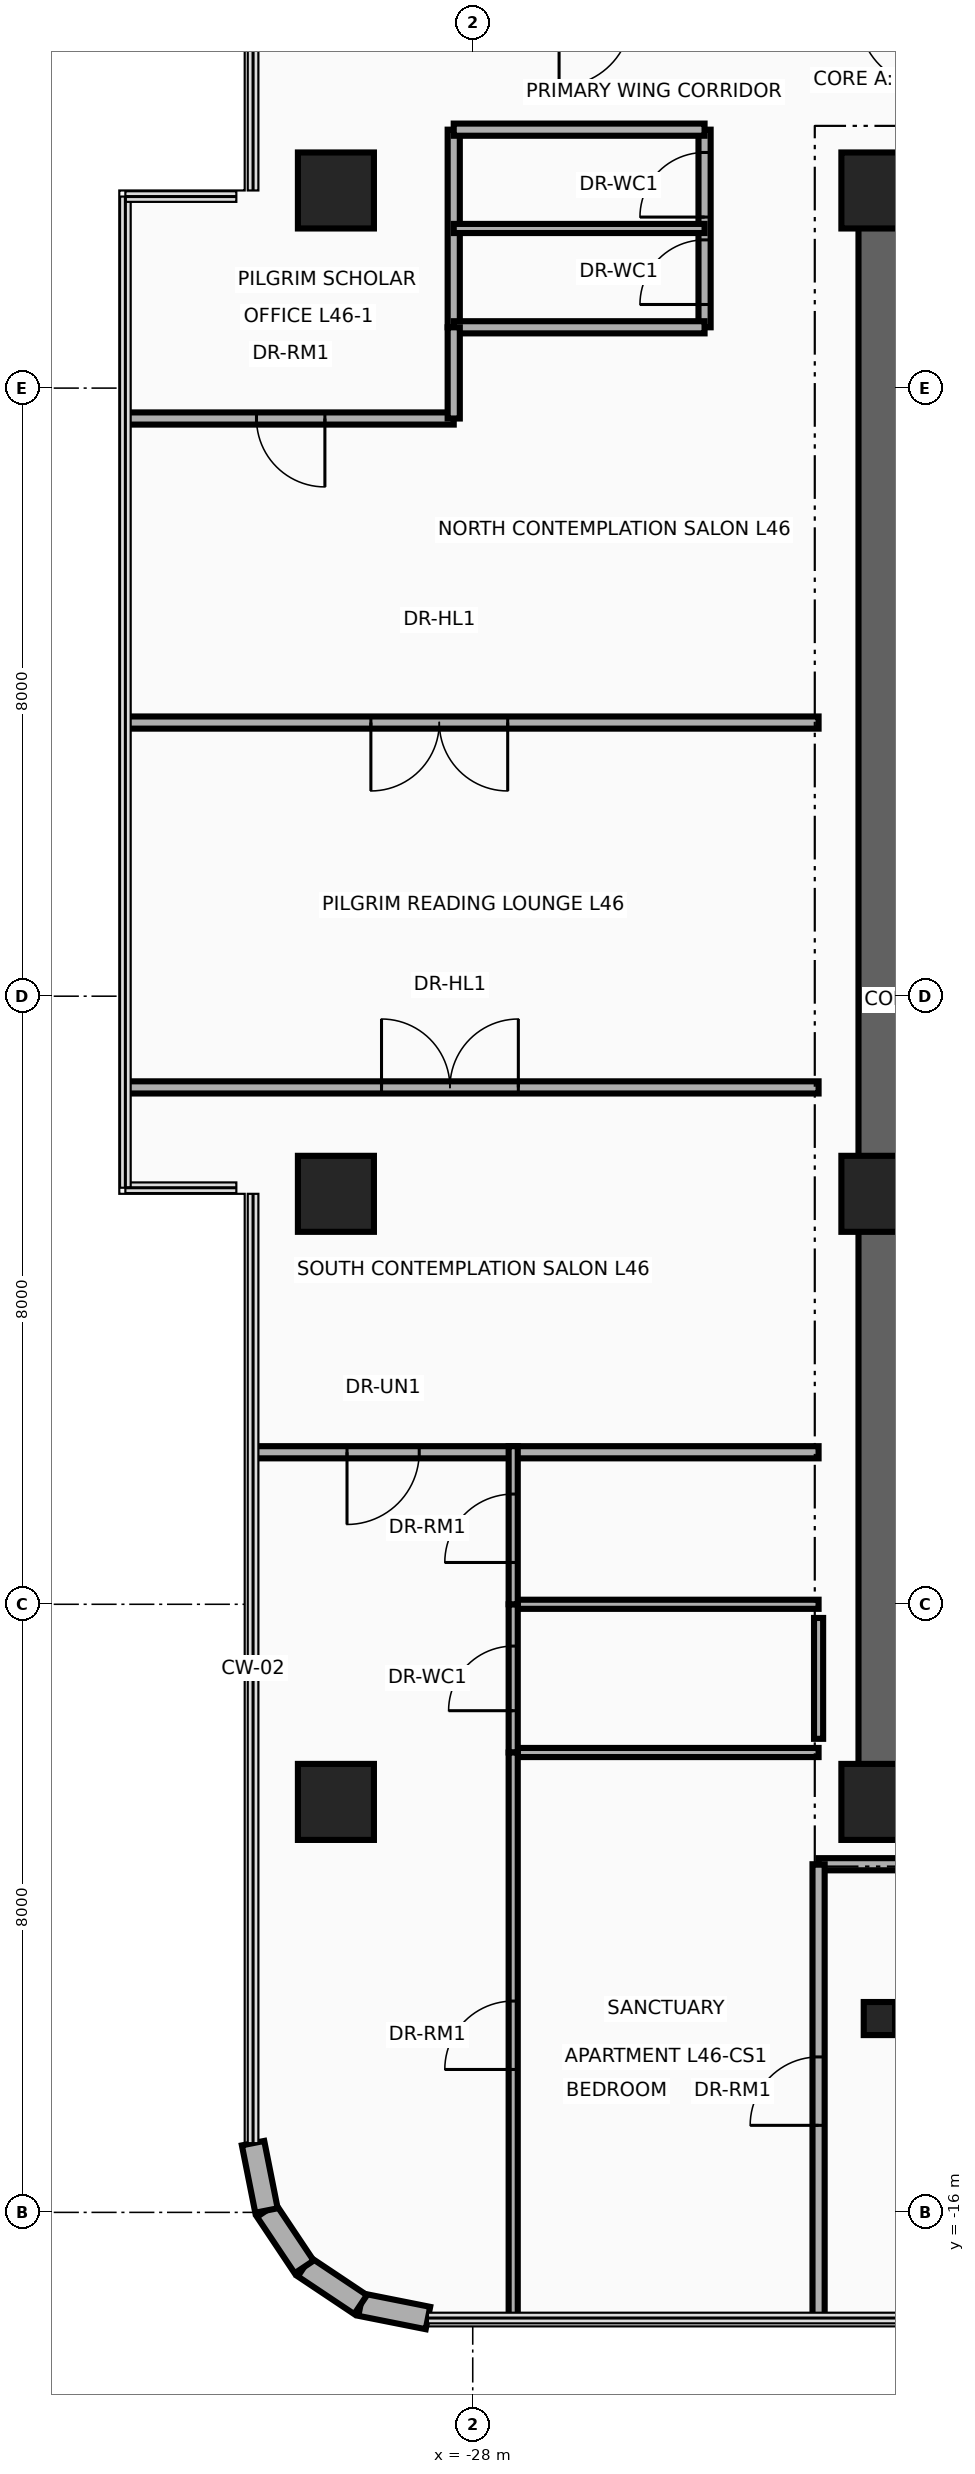
"""IFC4 building model, lengths in metres.
Left out: names, types, materials, properties, quantities, classifications, styles, units other than length and angle.
Written with IfcOpenShell. Run it as: python <this file> out.ifc"""

import sys

from ifc_helpers import new_model, si_unit, direction, frame, frame_2d, origin, origin_2d, place, context, subcontext, project, spatial, rectangle, i_section, extrude, source, transform, mapped, element, fill, save


model = new_model("IFC4")
c1 = context("Model", 3, precision=1e-05, world=origin(), true_north=direction((0.0, 1.0)))
c2 = subcontext(c1, "Body", "Model", "MODEL_VIEW")
j1 = project(units=[si_unit("LENGTHUNIT", "METRE"), si_unit("PLANEANGLEUNIT", "RADIAN")], contexts=[c1])
p1 = place(None, origin())
s1 = spatial("IfcSite", under=j1, at=p1, CompositionType="ELEMENT")
p2 = place(p1, origin())
s2 = spatial("IfcBuilding", under=s1, at=p2, CompositionType="ELEMENT")
p3 = place(p2, frame((0.0, 0.0, 180.5)))
s3 = spatial("IfcBuildingStorey", under=s2, at=p3, CompositionType="ELEMENT", Elevation=180.5)
p4 = place(p3, frame((-22.65, -11.075, 0.0), z_axis=(0.0, 0.0, 1.0), x_axis=(0.0, 1.0, 0.0)))
e1 = element("IfcWall", 1, at=p4, inside=s3, PredefinedType="SHEAR", context=c2, shape_type="SweptSolid", body=[
    extrude(rectangle(XDim=22.15, YDim=0.55, at=frame_2d((11.075, 0.0))), origin(), (0.0, 0.0, 1.0), 3.63),
])
for number, where, z_axis, x_axis in (
    (2, (-22.65, 10.8, 0.0), (0.0, 0.0, 1.0), (1.0, 0.0, 0.0)),
    (3, (-22.65, -10.8, 0.0), (0.0, 0.0, 1.0), (1.0, 0.0, 0.0)),
):
    element("IfcWall", number, at=place(p3, frame(where, z_axis=z_axis, x_axis=x_axis)), inside=s3, PredefinedType="SHEAR", context=c2, shape_type="SweptSolid", body=[
        extrude(rectangle(XDim=10.25, YDim=0.55, at=frame_2d((5.125, 0.0))), origin(), (0.0, 0.0, 1.0), 3.63),
    ])
m1 = source(origin(), c2, "Body", "SweptSolid", [
    extrude(rectangle(XDim=1.0, YDim=1.0, at=origin_2d()), origin(), (0.0, 0.0, 1.0), 3.95),
])
for number, where, z_axis, x_axis in (
    (4, (-29.8, -10.6, 0.0), (0.0, 0.0, 1.0), (1.0, 0.0, 0.0)),
    (5, (-22.65, -10.6, 0.0), (0.0, 0.0, 1.0), (1.0, 0.0, 0.0)),
    (6, (-29.8, -2.6, 0.0), (0.0, 0.0, 1.0), (1.0, 0.0, 0.0)),
    (7, (-22.65, -2.6, 0.0), (0.0, 0.0, 1.0), (1.0, 0.0, 0.0)),
    (8, (-29.8, 10.6, 0.0), (0.0, 0.0, 1.0), (1.0, 0.0, 0.0)),
    (9, (-22.65, 10.6, 0.0), (0.0, 0.0, 1.0), (1.0, 0.0, 0.0)),
):
    element("IfcColumn", number, at=place(p3, frame(where, z_axis=z_axis, x_axis=x_axis)), inside=s3, PredefinedType="COLUMN", context=c2, shape_type="MappedRepresentation", body=[
        mapped(m1, transform((0.0, 0.0, 0.0), x_axis=(1.0, 0.0, 0.0), y_axis=(0.0, 1.0, 0.0), z_axis=(0.0, 0.0, 1.0), scale=1.0)),
    ])
m2 = source(origin(), c2, "Body", "SweptSolid", [
    extrude(i_section(OverallWidth=0.412, OverallDepth=0.435, WebThickness=0.036, FlangeThickness=0.057, at=origin_2d()), origin(), (0.0, 0.0, 1.0), 3.95),
])
p5 = place(p3, frame((-22.65, -13.45, 0.0), z_axis=(0.0, 0.0, 1.0), x_axis=(1.0, 0.0, 0.0)))
e10 = element("IfcColumn", 10, at=p5, inside=s3, PredefinedType="COLUMN", context=c2, shape_type="MappedRepresentation", body=[
    mapped(m2, transform((0.0, 0.0, 0.0), x_axis=(1.0, 0.0, 0.0), y_axis=(0.0, 1.0, 0.0), z_axis=(0.0, 0.0, 1.0), scale=1.0)),
])
p6 = place(p3, frame((-28.589, -17.39, 0.0), z_axis=(0.0, 0.0, 1.0), x_axis=(-0.980798241101, 0.195025152871, 0.0)))
e11 = element("IfcWall", 11, at=p6, inside=s3, PredefinedType="SOLIDWALL", context=c2, shape_type="SweptSolid", body=[
    extrude(rectangle(XDim=0.904, YDim=0.3, at=frame_2d((0.452, 0.0))), origin(), (0.0, 0.0, 1.0), 3.63),
])
for number, where, z_axis, x_axis in (
    (12, (-29.476, -17.214, 0.0), (0.0, 0.0, 1.0), (-0.832, 0.556, 0.0)),
    (13, (-30.218, -16.718, 0.0), (0.0, 0.0, 1.0), (-0.556, 0.832, 0.0)),
):
    element("IfcWall", number, at=place(p3, frame(where, z_axis=z_axis, x_axis=x_axis)), inside=s3, PredefinedType="SOLIDWALL", context=c2, shape_type="SweptSolid", body=[
        extrude(rectangle(XDim=0.893, YDim=0.3, at=frame_2d((0.446, 0.0))), origin(), (0.0, 0.0, 1.0), 3.63),
    ])
p7 = place(p3, frame((-30.714, -15.976, 0.0), z_axis=(0.0, 0.0, 1.0), x_axis=(-0.195025152871, 0.980798241101, 0.0)))
e14 = element("IfcWall", 14, at=p7, inside=s3, PredefinedType="SOLIDWALL", context=c2, shape_type="SweptSolid", body=[
    extrude(rectangle(XDim=0.904, YDim=0.3, at=frame_2d((0.452, 0.0))), origin(), (0.0, 0.0, 1.0), 3.63),
])
p8 = place(p3, frame((-28.25, 8.8, 0.0), z_axis=(0.0, 0.0, 1.0), x_axis=(0.0, 1.0, 0.0)))
e15 = element("IfcWall", 15, at=p8, inside=s3, PredefinedType="PARTITIONING", context=c2, shape_type="SweptSolid", body=[
    extrude(rectangle(XDim=2.6, YDim=0.16, at=frame_2d((1.3, 0.0))), origin(), (0.0, 0.0, 1.0), 2.665),
])
p9 = place(p3, frame((-24.95, 8.8, 0.0), z_axis=(0.0, 0.0, 1.0), x_axis=(0.0, 1.0, 0.0)))
e16 = element("IfcWall", 16, at=p9, inside=s3, PredefinedType="PARTITIONING", context=c2, shape_type="SweptSolid", body=[
    extrude(rectangle(XDim=2.6, YDim=0.16, at=frame_2d((1.3, 0.0))), origin(), (0.0, 0.0, 1.0), 2.665),
])
p10 = place(p9, frame((0.3, 0.0, 0.0)))
e17 = element("IfcOpeningElement", 17, at=p10, cuts=e16, PredefinedType="OPENING", context=c2, shape_type="SweptSolid", body=[
    extrude(rectangle(XDim=0.85, YDim=2.1, at=frame_2d((0.425, 1.05))), frame((0.0, 0.095, 0.0), z_axis=(0.0, -1.0, 0.0), x_axis=(1.0, 0.0, 0.0)), (0.0, 0.0, 1.0), 0.19),
])
p11 = place(p9, frame((1.45, 0.0, 0.0)))
e18 = element("IfcOpeningElement", 18, at=p11, cuts=e16, PredefinedType="OPENING", context=c2, shape_type="SweptSolid", body=[
    extrude(rectangle(XDim=0.85, YDim=2.1, at=frame_2d((0.425, 1.05))), frame((0.0, 0.095, 0.0), z_axis=(0.0, -1.0, 0.0), x_axis=(1.0, 0.0, 0.0)), (0.0, 0.0, 1.0), 0.19),
])
for number, where, z_axis, x_axis in (
    (19, (-28.25, 8.8, 0.0), (0.0, 0.0, 1.0), (1.0, 0.0, 0.0)),
    (20, (-28.25, 11.4, 0.0), (0.0, 0.0, 1.0), (1.0, 0.0, 0.0)),
):
    element("IfcWall", number, at=place(p3, frame(where, z_axis=z_axis, x_axis=x_axis)), inside=s3, PredefinedType="PARTITIONING", context=c2, shape_type="SweptSolid", body=[
        extrude(rectangle(XDim=3.3, YDim=0.16, at=frame_2d((1.65, 0.0))), origin(), (0.0, 0.0, 1.0), 3.63),
    ])
p12 = place(p3, frame((-28.25, 10.1, 0.0), z_axis=(0.0, 0.0, 1.0), x_axis=(1.0, 0.0, 0.0)))
e21 = element("IfcWall", 21, at=p12, inside=s3, PredefinedType="PARTITIONING", context=c2, shape_type="SweptSolid", body=[
    extrude(rectangle(XDim=3.3, YDim=0.12, at=frame_2d((1.65, 0.0))), origin(), (0.0, 0.0, 1.0), 3.63),
])
p13 = place(p3, frame((-23.45, -11.42, 0.0), z_axis=(0.0, 0.0, 1.0), x_axis=(1.0, 0.0, 0.0)))
e22 = element("IfcWall", 22, at=p13, inside=s3, PredefinedType="PARTITIONING", context=c2, shape_type="SweptSolid", body=[
    extrude(rectangle(XDim=13.84, YDim=0.16, at=frame_2d((6.92, 0.0))), origin(), (0.0, 0.0, 1.0), 3.004),
])
p14 = place(p3, frame((-23.45, -17.39, 0.0), z_axis=(0.0, 0.0, 1.0), x_axis=(0.0, 1.0, 0.0)))
e23 = element("IfcWall", 23, at=p14, inside=s3, PredefinedType="PARTITIONING", context=c2, shape_type="SweptSolid", body=[
    extrude(rectangle(XDim=5.97, YDim=0.16, at=frame_2d((2.985, 0.0))), origin(), (0.0, 0.0, 1.0), 3.63),
])
p15 = place(p14, frame((2.535, 0.0, 0.0)))
e24 = element("IfcOpeningElement", 24, at=p15, cuts=e23, PredefinedType="OPENING", context=c2, shape_type="SweptSolid", body=[
    extrude(rectangle(XDim=0.9, YDim=2.1, at=frame_2d((0.45, 1.05))), frame((0.0, 0.095, 0.0), z_axis=(0.0, -1.0, 0.0), x_axis=(1.0, 0.0, 0.0)), (0.0, 0.0, 1.0), 0.19),
])
p16 = place(p3, frame((-30.89, -6.0, 0.0), z_axis=(0.0, 0.0, 1.0), x_axis=(1.0, 0.0, 0.0)))
e25 = element("IfcWall", 25, at=p16, inside=s3, PredefinedType="PARTITIONING", context=c2, shape_type="SweptSolid", body=[
    extrude(rectangle(XDim=7.44, YDim=0.16, at=frame_2d((3.72, 0.0))), origin(), (0.0, 0.0, 1.0), 3.076),
])
p17 = place(p16, frame((1.236, 0.0, 0.0)))
e26 = element("IfcOpeningElement", 26, at=p17, cuts=e25, PredefinedType="OPENING", context=c2, shape_type="SweptSolid", body=[
    extrude(rectangle(XDim=0.95, YDim=2.15, at=frame_2d((0.475, 1.075))), frame((0.0, 0.095, 0.0), z_axis=(0.0, -1.0, 0.0), x_axis=(1.0, 0.0, 0.0)), (0.0, 0.0, 1.0), 0.19),
])
p18 = place(p3, frame((-32.54, 7.6, 0.0), z_axis=(0.0, 0.0, 1.0), x_axis=(1.0, 0.0, 0.0)))
e27 = element("IfcWall", 27, at=p18, inside=s3, PredefinedType="PARTITIONING", context=c2, shape_type="SweptSolid", body=[
    extrude(rectangle(XDim=4.29, YDim=0.16, at=frame_2d((2.145, 0.0))), origin(), (0.0, 0.0, 1.0), 3.076),
])
p19 = place(p18, frame((1.695, 0.0, 0.0)))
e28 = element("IfcOpeningElement", 28, at=p19, cuts=e27, PredefinedType="OPENING", context=c2, shape_type="SweptSolid", body=[
    extrude(rectangle(XDim=0.9, YDim=2.1, at=frame_2d((0.45, 1.05))), frame((0.0, 0.095, 0.0), z_axis=(0.0, -1.0, 0.0), x_axis=(1.0, 0.0, 0.0)), (0.0, 0.0, 1.0), 0.19),
])
p20 = place(p3, frame((-28.25, 7.6, 0.0), z_axis=(0.0, 0.0, 1.0), x_axis=(0.0, 1.0, 0.0)))
e29 = element("IfcWall", 29, at=p20, inside=s3, PredefinedType="PARTITIONING", context=c2, shape_type="SweptSolid", body=[
    extrude(rectangle(XDim=1.2, YDim=0.16, at=frame_2d((0.6, 0.0))), origin(), (0.0, 0.0, 1.0), 3.158),
])
for number, where, z_axis, x_axis in (
    (30, (-27.468, -8.0, 0.0), (0.0, 0.0, 1.0), (1.0, 0.0, 0.0)),
    (31, (-27.468, -9.95, 0.0), (0.0, 0.0, 1.0), (1.0, 0.0, 0.0)),
):
    element("IfcWall", number, at=place(p3, frame(where, z_axis=z_axis, x_axis=x_axis)), inside=s3, PredefinedType="PARTITIONING", context=c2, shape_type="SweptSolid", body=[
        extrude(rectangle(XDim=4.018, YDim=0.12, at=frame_2d((2.009, 0.0))), origin(), (0.0, 0.0, 1.0), 3.63),
    ])
p21 = place(p3, frame((-27.468, -9.95, 0.0), z_axis=(0.0, 0.0, 1.0), x_axis=(0.0, 1.0, 0.0)))
e32 = element("IfcWall", 32, at=p21, inside=s3, PredefinedType="PARTITIONING", context=c2, shape_type="SweptSolid", body=[
    extrude(rectangle(XDim=1.95, YDim=0.12, at=frame_2d((0.975, 0.0))), origin(), (0.0, 0.0, 1.0), 3.158),
])
p22 = place(p21, frame((0.55, 0.0, 0.0)))
e33 = element("IfcOpeningElement", 33, at=p22, cuts=e32, PredefinedType="OPENING", context=c2, shape_type="SweptSolid", body=[
    extrude(rectangle(XDim=0.85, YDim=2.1, at=frame_2d((0.425, 1.05))), frame((0.0, 0.075, 0.0), z_axis=(0.0, -1.0, 0.0), x_axis=(1.0, 0.0, 0.0)), (0.0, 0.0, 1.0), 0.15),
])
p23 = place(p3, frame((-27.468, -8.0, 0.0), z_axis=(0.0, 0.0, 1.0), x_axis=(0.0, 1.0, 0.0)))
e34 = element("IfcWall", 34, at=p23, inside=s3, PredefinedType="PARTITIONING", context=c2, shape_type="SweptSolid", body=[
    extrude(rectangle(XDim=2.08, YDim=0.12, at=frame_2d((1.04, 0.0))), origin(), (0.0, 0.0, 1.0), 3.158),
])
p24 = place(p23, frame((0.55, 0.0, 0.0)))
e35 = element("IfcOpeningElement", 35, at=p24, cuts=e34, PredefinedType="OPENING", context=c2, shape_type="SweptSolid", body=[
    extrude(rectangle(XDim=0.9, YDim=2.1, at=frame_2d((0.45, 1.05))), frame((0.0, 0.075, 0.0), z_axis=(0.0, -1.0, 0.0), x_axis=(1.0, 0.0, 0.0)), (0.0, 0.0, 1.0), 0.15),
])
p25 = place(p3, frame((-27.468, -17.39, 0.0), z_axis=(0.0, 0.0, 1.0), x_axis=(0.0, 1.0, 0.0)))
e36 = element("IfcWall", 36, at=p25, inside=s3, PredefinedType="PARTITIONING", context=c2, shape_type="SweptSolid", body=[
    extrude(rectangle(XDim=7.44, YDim=0.12, at=frame_2d((3.72, 0.0))), origin(), (0.0, 0.0, 1.0), 2.665),
])
p26 = place(p25, frame((3.27, 0.0, 0.0)))
e37 = element("IfcOpeningElement", 37, at=p26, cuts=e36, PredefinedType="OPENING", context=c2, shape_type="SweptSolid", body=[
    extrude(rectangle(XDim=0.9, YDim=2.1, at=frame_2d((0.45, 1.05))), frame((0.0, 0.075, 0.0), z_axis=(0.0, -1.0, 0.0), x_axis=(1.0, 0.0, 0.0)), (0.0, 0.0, 1.0), 0.15),
])
p27 = place(p3, frame((-23.45, -9.77, 0.0), z_axis=(0.0, 0.0, 1.0), x_axis=(0.0, 1.0, 0.0)))
e38 = element("IfcWall", 38, at=p27, inside=s3, PredefinedType="PARTITIONING", context=c2, shape_type="SweptSolid", body=[
    extrude(rectangle(XDim=1.59, YDim=0.12, at=frame_2d((0.795, 0.0))), origin(), (0.0, 0.0, 1.0), 3.158),
])
p28 = place(p3, frame((-32.54, -1.2, 0.0), z_axis=(0.0, 0.0, 1.0), x_axis=(1.0, 0.0, 0.0)))
e39 = element("IfcWall", 39, at=p28, inside=s3, PredefinedType="PARTITIONING", context=c2, shape_type="SweptSolid", body=[
    extrude(rectangle(XDim=9.09, YDim=0.16, at=frame_2d((4.545, 0.0))), origin(), (0.0, 0.0, 1.0), 3.076),
])
p29 = place(p28, frame((3.34, 0.0, 0.0)))
e40 = element("IfcOpeningElement", 40, at=p29, cuts=e39, PredefinedType="OPENING", context=c2, shape_type="SweptSolid", body=[
    extrude(rectangle(XDim=1.8, YDim=2.15, at=frame_2d((0.9, 1.075))), frame((0.0, 0.095, 0.0), z_axis=(0.0, -1.0, 0.0), x_axis=(1.0, 0.0, 0.0)), (0.0, 0.0, 1.0), 0.19),
])
p30 = place(p3, frame((-32.54, 3.6, 0.0), z_axis=(0.0, 0.0, 1.0), x_axis=(1.0, 0.0, 0.0)))
e41 = element("IfcWall", 41, at=p30, inside=s3, PredefinedType="PARTITIONING", context=c2, shape_type="SweptSolid", body=[
    extrude(rectangle(XDim=9.09, YDim=0.16, at=frame_2d((4.545, 0.0))), origin(), (0.0, 0.0, 1.0), 3.076),
])
p31 = place(p30, frame((3.2, 0.0, 0.0)))
e42 = element("IfcOpeningElement", 42, at=p31, cuts=e41, PredefinedType="OPENING", context=c2, shape_type="SweptSolid", body=[
    extrude(rectangle(XDim=1.8, YDim=2.15, at=frame_2d((0.9, 1.075))), frame((0.0, 0.095, 0.0), z_axis=(0.0, -1.0, 0.0), x_axis=(1.0, 0.0, 0.0)), (0.0, 0.0, 1.0), 0.19),
])
p32 = place(p10, origin())
e43 = element("IfcDoor", 43, at=p32, inside=s3, OperationType="SINGLE_SWING_LEFT", PredefinedType="DOOR", context=c2, shape_type="SweptSolid", body=[
    extrude(rectangle(XDim=0.85, YDim=2.1, at=frame_2d((0.425, 1.05))), frame((0.0, 0.025, 0.0), z_axis=(0.0, -1.0, 0.0), x_axis=(1.0, 0.0, 0.0)), (0.0, 0.0, 1.0), 0.05),
])
fill(e17, e43)
p33 = place(p11, origin())
e44 = element("IfcDoor", 44, at=p33, inside=s3, OperationType="SINGLE_SWING_RIGHT", PredefinedType="DOOR", context=c2, shape_type="SweptSolid", body=[
    extrude(rectangle(XDim=0.85, YDim=2.1, at=frame_2d((0.425, 1.05))), frame((0.0, 0.025, 0.0), z_axis=(0.0, -1.0, 0.0), x_axis=(1.0, 0.0, 0.0)), (0.0, 0.0, 1.0), 0.05),
])
fill(e18, e44)
p34 = place(p17, frame((0.95, 0.0, 0.0), z_axis=(0.0, 0.0, 1.0), x_axis=(-1.0, 0.0, 0.0)))
e45 = element("IfcDoor", 45, at=p34, inside=s3, OperationType="SINGLE_SWING_LEFT", PredefinedType="DOOR", context=c2, shape_type="SweptSolid", body=[
    extrude(rectangle(XDim=0.95, YDim=2.15, at=frame_2d((0.475, 1.075))), frame((0.0, 0.025, 0.0), z_axis=(0.0, -1.0, 0.0), x_axis=(1.0, 0.0, 0.0)), (0.0, 0.0, 1.0), 0.05),
])
fill(e26, e45)
p35 = place(p22, origin())
e46 = element("IfcDoor", 46, at=p35, inside=s3, OperationType="SINGLE_SWING_RIGHT", PredefinedType="DOOR", context=c2, shape_type="SweptSolid", body=[
    extrude(rectangle(XDim=0.85, YDim=2.1, at=frame_2d((0.425, 1.05))), frame((0.0, 0.025, 0.0), z_axis=(0.0, -1.0, 0.0), x_axis=(1.0, 0.0, 0.0)), (0.0, 0.0, 1.0), 0.05),
])
fill(e33, e46)
p36 = place(p24, origin())
e47 = element("IfcDoor", 47, at=p36, inside=s3, OperationType="SINGLE_SWING_LEFT", PredefinedType="DOOR", context=c2, shape_type="SweptSolid", body=[
    extrude(rectangle(XDim=0.9, YDim=2.1, at=frame_2d((0.45, 1.05))), frame((0.0, 0.025, 0.0), z_axis=(0.0, -1.0, 0.0), x_axis=(1.0, 0.0, 0.0)), (0.0, 0.0, 1.0), 0.05),
])
fill(e35, e47)
p37 = place(p26, origin())
e48 = element("IfcDoor", 48, at=p37, inside=s3, OperationType="SINGLE_SWING_RIGHT", PredefinedType="DOOR", context=c2, shape_type="SweptSolid", body=[
    extrude(rectangle(XDim=0.9, YDim=2.1, at=frame_2d((0.45, 1.05))), frame((0.0, 0.025, 0.0), z_axis=(0.0, -1.0, 0.0), x_axis=(1.0, 0.0, 0.0)), (0.0, 0.0, 1.0), 0.05),
])
fill(e37, e48)
p38 = place(p19, frame((0.9, 0.0, 0.0), z_axis=(0.0, 0.0, 1.0), x_axis=(-1.0, 0.0, 0.0)))
e49 = element("IfcDoor", 49, at=p38, inside=s3, OperationType="SINGLE_SWING_LEFT", PredefinedType="DOOR", context=c2, shape_type="SweptSolid", body=[
    extrude(rectangle(XDim=0.9, YDim=2.1, at=frame_2d((0.45, 1.05))), frame((0.0, 0.025, 0.0), z_axis=(0.0, -1.0, 0.0), x_axis=(1.0, 0.0, 0.0)), (0.0, 0.0, 1.0), 0.05),
])
fill(e28, e49)
p39 = place(p29, origin())
e50 = element("IfcDoor", 50, at=p39, inside=s3, OperationType="DOUBLE_DOOR_SINGLE_SWING", PredefinedType="DOOR", context=c2, shape_type="SweptSolid", body=[
    extrude(rectangle(XDim=1.8, YDim=2.15, at=frame_2d((0.9, 1.075))), frame((0.0, 0.025, 0.0), z_axis=(0.0, -1.0, 0.0), x_axis=(1.0, 0.0, 0.0)), (0.0, 0.0, 1.0), 0.05),
])
fill(e40, e50)
p40 = place(p31, frame((1.8, 0.0, 0.0), z_axis=(0.0, 0.0, 1.0), x_axis=(-1.0, 0.0, 0.0)))
e51 = element("IfcDoor", 51, at=p40, inside=s3, OperationType="DOUBLE_DOOR_SINGLE_SWING", PredefinedType="DOOR", context=c2, shape_type="SweptSolid", body=[
    extrude(rectangle(XDim=1.8, YDim=2.15, at=frame_2d((0.9, 1.075))), frame((0.0, 0.025, 0.0), z_axis=(0.0, -1.0, 0.0), x_axis=(1.0, 0.0, 0.0)), (0.0, 0.0, 1.0), 0.05),
])
fill(e42, e51)
p41 = place(p15, origin())
e52 = element("IfcDoor", 52, at=p41, inside=s3, OperationType="SINGLE_SWING_RIGHT", PredefinedType="DOOR", context=c2, shape_type="SweptSolid", body=[
    extrude(rectangle(XDim=0.9, YDim=2.1, at=frame_2d((0.45, 1.05))), frame((0.0, 0.025, 0.0), z_axis=(0.0, -1.0, 0.0), x_axis=(1.0, 0.0, 0.0)), (0.0, 0.0, 1.0), 0.05),
])
fill(e24, e52)
save(model, sys.argv[1])
